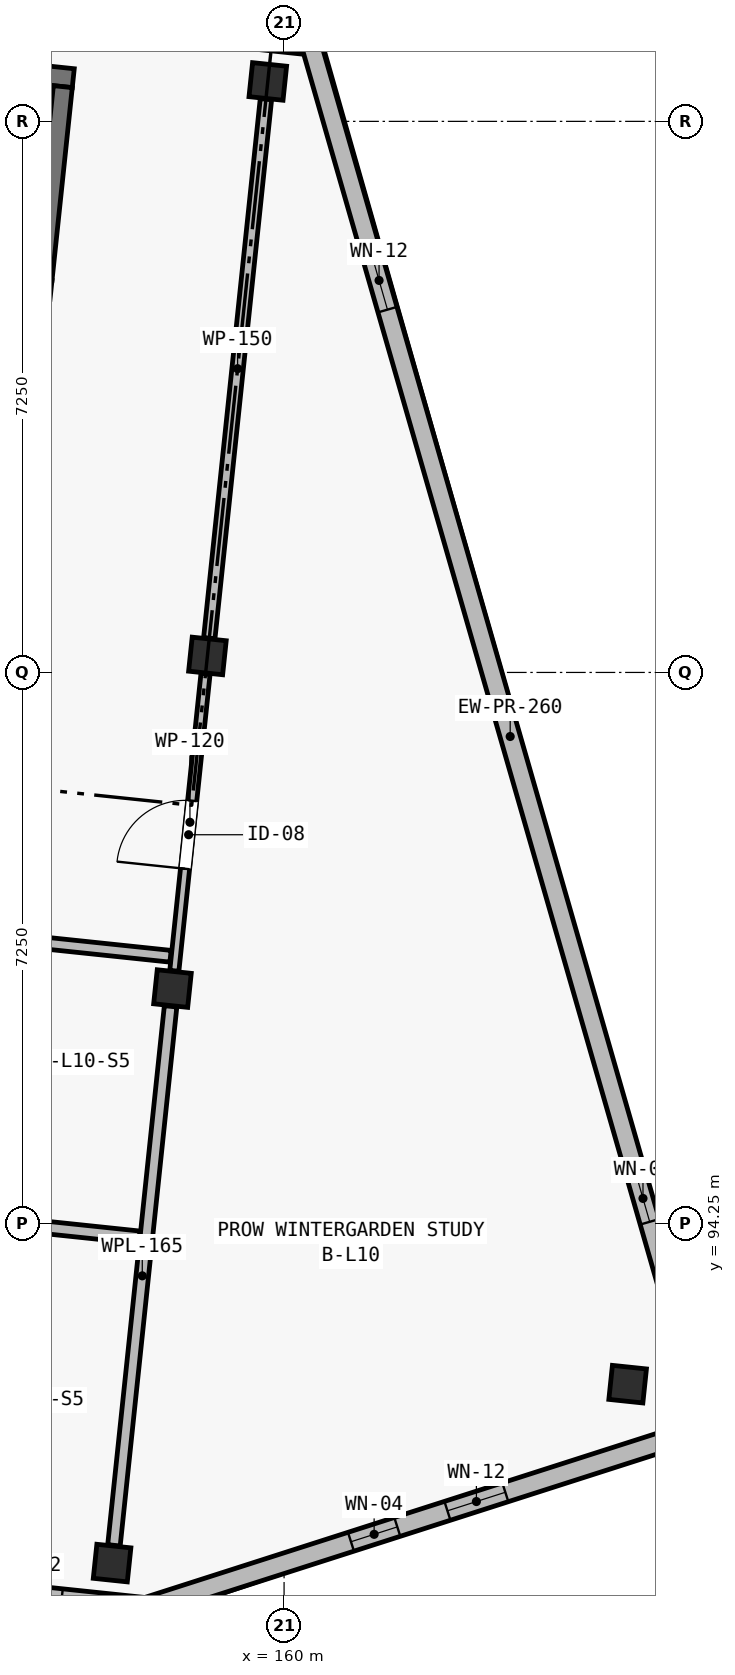
"""IFC4 building model, lengths in metres.
Left out: names, types, materials, properties, quantities, classifications, styles, units other than length and angle.
Written with IfcOpenShell. Run it as: python <this file> out.ifc"""

import sys

from ifc_helpers import new_model, si_unit, direction, frame, frame_2d, origin, origin_2d, place, context, subcontext, project, spatial, rectangle, extrude, element, fill, save


model = new_model("IFC4")
c1 = context("Model", 3, precision=1e-05, world=origin(), true_north=direction((0.0, 1.0)))
c2 = subcontext(c1, "Body", "Model", "MODEL_VIEW")
j1 = project(units=[si_unit("LENGTHUNIT", "METRE"), si_unit("PLANEANGLEUNIT", "RADIAN")], contexts=[c1])
p1 = place(None, origin())
s1 = spatial("IfcSite", under=j1, at=p1, CompositionType="ELEMENT")
p2 = place(p1, origin())
s2 = spatial("IfcBuilding", under=s1, at=p2, CompositionType="ELEMENT")
p3 = place(p2, frame((0.0, 0.0, 34.4)))
s3 = spatial("IfcBuildingStorey", under=s2, at=p3, CompositionType="ELEMENT", Elevation=34.4)
for number, where, z_axis, x_axis in (
    (1, (157.737, 89.783, 0.0), (0.0, 0.0, 1.0), (0.995, -0.105, 0.0)),
    (2, (158.531, 97.341, 0.0), (0.0, 0.0, 1.0), (0.995, -0.105, 0.0)),
    (3, (158.991, 101.717, 0.0), (0.0, 0.0, 1.0), (0.995, -0.105, 0.0)),
    (4, (159.786, 109.275, 0.0), (0.0, 0.0, 1.0), (0.995, -0.105, 0.0)),
    (5, (164.52, 92.136, 0.0), (0.0, 0.0, 1.0), (0.995, -0.105, 0.0)),
):
    element("IfcColumn", number, at=place(p3, frame(where, z_axis=z_axis, x_axis=x_axis)), inside=s3, PredefinedType="COLUMN", context=c2, shape_type="SweptSolid", body=[
        extrude(rectangle(XDim=0.45, YDim=0.45, at=origin_2d()), origin(), (0.0, 0.0, 1.0), 3.25),
    ])
p4 = place(p3, frame((152.204, 109.846, 0.0), z_axis=(0.0, 0.0, 1.0), x_axis=(0.994522922189, -0.104518693261, 0.0)))
e6 = element("IfcWall", 6, at=p4, inside=s3, PredefinedType="SHEAR", context=c2, shape_type="SweptSolid", body=[
    extrude(rectangle(XDim=5.05, YDim=0.25, at=frame_2d((2.525, 0.0))), origin(), (0.0, 0.0, 1.0), 3.25),
])
p5 = place(p3, frame((156.822, 106.671, 0.0), z_axis=(0.0, 0.0, 1.0), x_axis=(0.104545242946, 0.99452013161, 0.0)))
e7 = element("IfcWall", 7, at=p5, inside=s3, PredefinedType="SHEAR", context=c2, shape_type="SweptSolid", body=[
    extrude(rectangle(XDim=2.55, YDim=0.25, at=frame_2d((1.275, 0.0))), origin(), (0.0, 0.0, 1.0), 3.25),
])
p6 = place(p3, frame((158.204, 89.206, 0.0), z_axis=(0.0, 0.0, 1.0), x_axis=(-0.994521760736, 0.104529744196, 0.0)))
e8 = element("IfcWall", 8, at=p6, inside=s3, PredefinedType="SOLIDWALL", context=c2, shape_type="SweptSolid", body=[
    extrude(rectangle(XDim=8.525, YDim=0.24, at=frame_2d((4.262, 0.0))), origin(), (0.0, 0.0, 1.0), 3.0),
])
p7 = place(p6, frame((1.135, 0.0, 0.42)))
e9 = element("IfcOpeningElement", 9, at=p7, cuts=e8, PredefinedType="OPENING", context=c2, shape_type="SweptSolid", body=[
    extrude(rectangle(XDim=0.8, YDim=2.3, at=frame_2d((0.4, 1.15))), frame((0.0, 0.135, 0.0), z_axis=(0.0, -1.0, 0.0), x_axis=(1.0, 0.0, 0.0)), (0.0, 0.0, 1.0), 0.27),
])
p8 = place(p6, frame((2.605, 0.0, 0.48)))
e10 = element("IfcOpeningElement", 10, at=p8, cuts=e8, PredefinedType="OPENING", context=c2, shape_type="SweptSolid", body=[
    extrude(rectangle(XDim=0.82, YDim=2.18, at=frame_2d((0.41, 1.09))), frame((0.0, 0.135, 0.0), z_axis=(0.0, -1.0, 0.0), x_axis=(1.0, 0.0, 0.0)), (0.0, 0.0, 1.0), 0.27),
])
p9 = place(p6, frame((5.844, 0.0, 0.42)))
e11 = element("IfcOpeningElement", 11, at=p9, cuts=e8, PredefinedType="OPENING", context=c2, shape_type="SweptSolid", body=[
    extrude(rectangle(XDim=0.86, YDim=2.36, at=frame_2d((0.43, 1.18))), frame((0.0, 0.135, 0.0), z_axis=(0.0, -1.0, 0.0), x_axis=(1.0, 0.0, 0.0)), (0.0, 0.0, 1.0), 0.27),
])
p10 = place(p3, frame((151.885, 110.634, 0.0), z_axis=(0.0, 0.0, 1.0), x_axis=(0.994521760736, -0.104529744196, 0.0)))
e12 = element("IfcWall", 12, at=p10, inside=s3, PredefinedType="SOLIDWALL", context=c2, shape_type="SweptSolid", body=[
    extrude(rectangle(XDim=8.525, YDim=0.24, at=frame_2d((4.262, 0.0))), origin(), (0.0, 0.0, 1.0), 3.0),
])
p11 = place(p3, frame((160.363, 109.742, 0.0), z_axis=(0.0, 0.0, 1.0), x_axis=(0.276322184526, -0.961065060409, 0.0)))
e13 = element("IfcWall", 13, at=p11, inside=s3, PredefinedType="SOLIDWALL", context=c2, shape_type="SweptSolid", body=[
    extrude(rectangle(XDim=18.907, YDim=0.26, at=frame_2d((9.453, 0.0))), origin(), (0.0, 0.0, 1.0), 3.0),
])
p12 = place(p11, frame((2.81, 0.0, 0.45)))
e14 = element("IfcOpeningElement", 14, at=p12, cuts=e13, PredefinedType="OPENING", context=c2, shape_type="SweptSolid", body=[
    extrude(rectangle(XDim=0.8, YDim=2.3, at=frame_2d((0.4, 1.15))), frame((0.0, 0.145, 0.0), z_axis=(0.0, -1.0, 0.0), x_axis=(1.0, 0.0, 0.0)), (0.0, 0.0, 1.0), 0.29),
])
p13 = place(p11, frame((15.457, 0.0, 0.52)))
e15 = element("IfcOpeningElement", 15, at=p13, cuts=e13, PredefinedType="OPENING", context=c2, shape_type="SweptSolid", body=[
    extrude(rectangle(XDim=0.64, YDim=2.18, at=frame_2d((0.32, 1.09))), frame((0.0, 0.145, 0.0), z_axis=(0.0, -1.0, 0.0), x_axis=(1.0, 0.0, 0.0)), (0.0, 0.0, 1.0), 0.29),
])
p14 = place(p3, frame((165.587, 91.572, 0.0), z_axis=(0.0, 0.0, 1.0), x_axis=(-0.9522851043, -0.305209895201, 0.0)))
e16 = element("IfcWall", 16, at=p14, inside=s3, PredefinedType="SOLIDWALL", context=c2, shape_type="SweptSolid", body=[
    extrude(rectangle(XDim=7.753, YDim=0.26, at=frame_2d((3.876, 0.0))), origin(), (0.0, 0.0, 1.0), 3.0),
])
p15 = place(p14, frame((2.81, 0.0, 0.45)))
e17 = element("IfcOpeningElement", 17, at=p15, cuts=e16, PredefinedType="OPENING", context=c2, shape_type="SweptSolid", body=[
    extrude(rectangle(XDim=0.8, YDim=2.3, at=frame_2d((0.4, 1.15))), frame((0.0, 0.145, 0.0), z_axis=(0.0, -1.0, 0.0), x_axis=(1.0, 0.0, 0.0)), (0.0, 0.0, 1.0), 0.29),
])
p16 = place(p14, frame((4.303, 0.0, 0.52)))
e18 = element("IfcOpeningElement", 18, at=p16, cuts=e16, PredefinedType="OPENING", context=c2, shape_type="SweptSolid", body=[
    extrude(rectangle(XDim=0.64, YDim=2.18, at=frame_2d((0.32, 1.09))), frame((0.0, 0.145, 0.0), z_axis=(0.0, -1.0, 0.0), x_axis=(1.0, 0.0, 0.0)), (0.0, 0.0, 1.0), 0.29),
])
p17 = place(p3, frame((158.556, 97.575, 0.0), z_axis=(0.0, 0.0, 1.0), x_axis=(0.104490754769, 0.994525857968, 0.0)))
e19 = element("IfcWall", 19, at=p17, inside=s3, PredefinedType="PARTITIONING", context=c2, shape_type="SweptSolid", body=[
    extrude(rectangle(XDim=3.93, YDim=0.12, at=frame_2d((1.965, 0.0))), origin(), (0.0, 0.0, 1.0), 2.5),
])
p18 = place(p17, frame((1.35, 0.0, 0.0)))
e20 = element("IfcOpeningElement", 20, at=p18, cuts=e19, PredefinedType="OPENING", context=c2, shape_type="SweptSolid", body=[
    extrude(rectangle(XDim=0.9, YDim=2.1, at=frame_2d((0.45, 1.05))), frame((0.0, 0.075, 0.0), z_axis=(0.0, -1.0, 0.0), x_axis=(1.0, 0.0, 0.0)), (0.0, 0.0, 1.0), 0.15),
])
p19 = place(p3, frame((159.016, 101.951, 0.0), z_axis=(0.0, 0.0, 1.0), x_axis=(0.104540404715, 0.994520640199, 0.0)))
e21 = element("IfcWall", 21, at=p19, inside=s3, PredefinedType="PARTITIONING", context=c2, shape_type="SweptSolid", body=[
    extrude(rectangle(XDim=7.13, YDim=0.15, at=frame_2d((3.565, 0.0))), origin(), (0.0, 0.0, 1.0), 2.5),
])
p20 = place(p3, frame((157.762, 90.016, 0.0), z_axis=(0.0, 0.0, 1.0), x_axis=(0.10450653689, 0.994524199679, 0.0)))
e22 = element("IfcWall", 22, at=p20, inside=s3, PredefinedType="PLUMBINGWALL", context=c2, shape_type="SweptSolid", body=[
    extrude(rectangle(XDim=7.13, YDim=0.165, at=frame_2d((3.565, 0.0))), origin(), (0.0, 0.0, 1.0), 2.5),
])
p21 = place(p3, frame((150.853, 98.57, 0.0), z_axis=(0.0, 0.0, 1.0), x_axis=(0.994523865423, -0.104509717754, 0.0)))
e23 = element("IfcWall", 23, at=p21, inside=s3, PredefinedType="PARTITIONING", context=c2, shape_type="SweptSolid", body=[
    extrude(rectangle(XDim=7.695, YDim=0.155, at=frame_2d((3.848, 0.0))), origin(), (0.0, 0.0, 1.0), 2.97),
])
p22 = place(p21, frame((1.455, 0.0, 0.0)))
e24 = element("IfcOpeningElement", 24, at=p22, cuts=e23, PredefinedType="OPENING", context=c2, shape_type="SweptSolid", body=[
    extrude(rectangle(XDim=1.02, YDim=2.2, at=frame_2d((0.51, 1.1))), frame((0.0, 0.093, 0.0), z_axis=(0.0, -1.0, 0.0), x_axis=(1.0, 0.0, 0.0)), (0.0, 0.0, 1.0), 0.185),
])
p23 = place(p3, frame((154.208, 94.477, 0.0), z_axis=(0.0, 0.0, 1.0), x_axis=(0.994521863919, -0.104528762491, 0.0)))
e25 = element("IfcWall", 25, at=p23, inside=s3, PredefinedType="PLUMBINGWALL", context=c2, shape_type="SweptSolid", body=[
    extrude(rectangle(XDim=3.91, YDim=0.165, at=frame_2d((1.955, 0.0))), origin(), (0.0, 0.0, 1.0), 2.97),
])
p24 = place(p23, frame((1.4, 0.0, 0.0)))
e26 = element("IfcOpeningElement", 26, at=p24, cuts=e25, PredefinedType="OPENING", context=c2, shape_type="SweptSolid", body=[
    extrude(rectangle(XDim=0.82, YDim=2.08, at=frame_2d((0.41, 1.04))), frame((0.0, 0.097, 0.0), z_axis=(0.0, -1.0, 0.0), x_axis=(1.0, 0.0, 0.0)), (0.0, 0.0, 1.0), 0.195),
])
p25 = place(p7, origin())
e27 = element("IfcWindow", 27, at=p25, inside=s3, PartitioningType="SINGLE_PANEL", PredefinedType="WINDOW", context=c2, shape_type="SweptSolid", body=[
    extrude(rectangle(XDim=0.8, YDim=2.3, at=frame_2d((0.4, 1.15))), frame((0.0, 0.03, 0.0), z_axis=(0.0, -1.0, 0.0), x_axis=(1.0, 0.0, 0.0)), (0.0, 0.0, 1.0), 0.06),
])
fill(e9, e27)
p26 = place(p12, origin())
e28 = element("IfcWindow", 28, at=p26, inside=s3, PartitioningType="SINGLE_PANEL", PredefinedType="WINDOW", context=c2, shape_type="SweptSolid", body=[
    extrude(rectangle(XDim=0.8, YDim=2.3, at=frame_2d((0.4, 1.15))), frame((0.0, 0.03, 0.0), z_axis=(0.0, -1.0, 0.0), x_axis=(1.0, 0.0, 0.0)), (0.0, 0.0, 1.0), 0.06),
])
fill(e14, e28)
p27 = place(p13, origin())
e29 = element("IfcWindow", 29, at=p27, inside=s3, PartitioningType="SINGLE_PANEL", PredefinedType="WINDOW", context=c2, shape_type="SweptSolid", body=[
    extrude(rectangle(XDim=0.64, YDim=2.18, at=frame_2d((0.32, 1.09))), frame((0.0, 0.03, 0.0), z_axis=(0.0, -1.0, 0.0), x_axis=(1.0, 0.0, 0.0)), (0.0, 0.0, 1.0), 0.06),
])
fill(e15, e29)
p28 = place(p15, origin())
e30 = element("IfcWindow", 30, at=p28, inside=s3, PartitioningType="SINGLE_PANEL", PredefinedType="WINDOW", context=c2, shape_type="SweptSolid", body=[
    extrude(rectangle(XDim=0.8, YDim=2.3, at=frame_2d((0.4, 1.15))), frame((0.0, 0.03, 0.0), z_axis=(0.0, -1.0, 0.0), x_axis=(1.0, 0.0, 0.0)), (0.0, 0.0, 1.0), 0.06),
])
fill(e17, e30)
p29 = place(p16, origin())
e31 = element("IfcWindow", 31, at=p29, inside=s3, PartitioningType="SINGLE_PANEL", PredefinedType="WINDOW", context=c2, shape_type="SweptSolid", body=[
    extrude(rectangle(XDim=0.64, YDim=2.18, at=frame_2d((0.32, 1.09))), frame((0.0, 0.03, 0.0), z_axis=(0.0, -1.0, 0.0), x_axis=(1.0, 0.0, 0.0)), (0.0, 0.0, 1.0), 0.06),
])
fill(e18, e31)
p30 = place(p18, origin())
e32 = element("IfcDoor", 32, at=p30, inside=s3, OperationType="SINGLE_SWING_LEFT", PredefinedType="DOOR", context=c2, shape_type="SweptSolid", body=[
    extrude(rectangle(XDim=0.9, YDim=2.1, at=frame_2d((0.45, 1.05))), frame((0.0, 0.025, 0.0), z_axis=(0.0, -1.0, 0.0), x_axis=(1.0, 0.0, 0.0)), (0.0, 0.0, 1.0), 0.05),
])
fill(e20, e32)
save(model, sys.argv[1])
